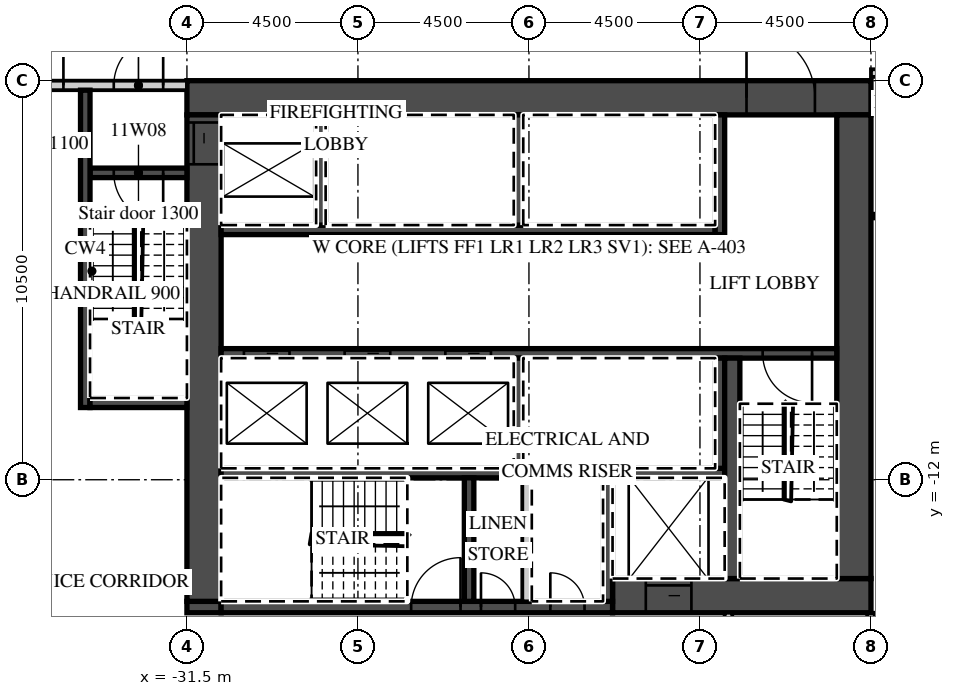
"""IFC4 building model, lengths in metres.
Left out: names, types, materials, properties, quantities, classifications, styles, units other than length and angle.
Written with IfcOpenShell. Run it as: python <this file> out.ifc"""

import sys

from ifc_helpers import new_model, si_unit, direction, frame, frame_2d, origin, place, context, subcontext, project, spatial, rectangle, extrude, element, fill, save


model = new_model("IFC4")
c1 = context("Model", 3, precision=1e-05, world=origin(), true_north=direction((0.0, 1.0)))
c2 = subcontext(c1, "Body", "Model", "MODEL_VIEW")
j1 = project(units=[si_unit("LENGTHUNIT", "METRE"), si_unit("PLANEANGLEUNIT", "RADIAN")], contexts=[c1])
p1 = place(None, origin())
s1 = spatial("IfcSite", under=j1, at=p1, CompositionType="ELEMENT")
p2 = place(p1, origin())
s2 = spatial("IfcBuilding", under=s1, at=p2, CompositionType="ELEMENT")
p3 = place(p2, frame((0.0, 0.0, 66.6)))
s3 = spatial("IfcBuildingStorey", under=s2, at=p3, CompositionType="ELEMENT", Elevation=66.6)
p4 = place(p3, frame((-13.5, -21.55, 0.0), z_axis=(0.0, 0.0, 1.0), x_axis=(0.0, 1.0, 0.0)))
e1 = element("IfcWall", 1, at=p4, inside=s3, PredefinedType="PARTITIONING", context=c2, shape_type="SweptSolid", body=[
    extrude(rectangle(XDim=6.05, YDim=0.2, at=frame_2d((3.025, 0.0))), origin(), (0.0, 0.0, 1.0), 3.02),
])
p5 = place(p3, frame((-13.5, -1.3, 0.0), z_axis=(0.0, 0.0, 1.0), x_axis=(1.0, 0.0, 0.0)))
e2 = element("IfcWall", 2, at=p5, inside=s3, PredefinedType="PARTITIONING", context=c2, shape_type="SweptSolid", body=[
    extrude(rectangle(XDim=58.05, YDim=0.2, at=frame_2d((29.025, 0.0))), origin(), (0.0, 0.0, 1.0), 3.02),
])
p6 = place(p5, frame((2.925, 0.0, 0.0)))
e3 = element("IfcOpeningElement", 3, at=p6, cuts=e2, PredefinedType="OPENING", context=c2, shape_type="SweptSolid", body=[
    extrude(rectangle(XDim=1.0, YDim=2.1, at=frame_2d((0.5, 1.05))), frame((0.0, 0.11, 0.0), z_axis=(0.0, -1.0, 0.0), x_axis=(1.0, 0.0, 0.0)), (0.0, 0.0, 1.0), 0.22),
])
p7 = place(p5, frame((9.863, 0.0, 0.0)))
e4 = element("IfcOpeningElement", 4, at=p7, cuts=e2, PredefinedType="OPENING", context=c2, shape_type="SweptSolid", body=[
    extrude(rectangle(XDim=1.2, YDim=2.1, at=frame_2d((0.6, 1.05))), frame((0.0, 0.11, 0.0), z_axis=(0.0, -1.0, 0.0), x_axis=(1.0, 0.0, 0.0)), (0.0, 0.0, 1.0), 0.22),
])
p8 = place(p5, frame((16.45, 0.0, 0.0)))
e5 = element("IfcOpeningElement", 5, at=p8, cuts=e2, PredefinedType="OPENING", context=c2, shape_type="SweptSolid", body=[
    extrude(rectangle(XDim=1.0, YDim=2.1, at=frame_2d((0.5, 1.05))), frame((0.0, 0.11, 0.0), z_axis=(0.0, -1.0, 0.0), x_axis=(1.0, 0.0, 0.0)), (0.0, 0.0, 1.0), 0.22),
])
p9 = place(p5, frame((18.55, 0.0, 0.0)))
e6 = element("IfcOpeningElement", 6, at=p9, cuts=e2, PredefinedType="OPENING", context=c2, shape_type="SweptSolid", body=[
    extrude(rectangle(XDim=1.0, YDim=2.1, at=frame_2d((0.5, 1.05))), frame((0.0, 0.11, 0.0), z_axis=(0.0, -1.0, 0.0), x_axis=(1.0, 0.0, 0.0)), (0.0, 0.0, 1.0), 0.22),
])
p10 = place(p5, frame((24.938, 0.0, 0.0)))
e7 = element("IfcOpeningElement", 7, at=p10, cuts=e2, PredefinedType="OPENING", context=c2, shape_type="SweptSolid", body=[
    extrude(rectangle(XDim=1.2, YDim=2.1, at=frame_2d((0.6, 1.05))), frame((0.0, 0.11, 0.0), z_axis=(0.0, -1.0, 0.0), x_axis=(1.0, 0.0, 0.0)), (0.0, 0.0, 1.0), 0.22),
])
p11 = place(p5, frame((33.938, 0.0, 0.0)))
e8 = element("IfcOpeningElement", 8, at=p11, cuts=e2, PredefinedType="OPENING", context=c2, shape_type="SweptSolid", body=[
    extrude(rectangle(XDim=1.2, YDim=2.1, at=frame_2d((0.6, 1.05))), frame((0.0, 0.11, 0.0), z_axis=(0.0, -1.0, 0.0), x_axis=(1.0, 0.0, 0.0)), (0.0, 0.0, 1.0), 0.22),
])
p12 = place(p5, frame((42.938, 0.0, 0.0)))
e9 = element("IfcOpeningElement", 9, at=p12, cuts=e2, PredefinedType="OPENING", context=c2, shape_type="SweptSolid", body=[
    extrude(rectangle(XDim=1.2, YDim=2.1, at=frame_2d((0.6, 1.05))), frame((0.0, 0.11, 0.0), z_axis=(0.0, -1.0, 0.0), x_axis=(1.0, 0.0, 0.0)), (0.0, 0.0, 1.0), 0.22),
])
p13 = place(p5, frame((52.425, 0.0, 0.0)))
e10 = element("IfcOpeningElement", 10, at=p13, cuts=e2, PredefinedType="OPENING", context=c2, shape_type="SweptSolid", body=[
    extrude(rectangle(XDim=1.0, YDim=2.1, at=frame_2d((0.5, 1.05))), frame((0.0, 0.11, 0.0), z_axis=(0.0, -1.0, 0.0), x_axis=(1.0, 0.0, 0.0)), (0.0, 0.0, 1.0), 0.22),
])
p14 = place(p5, frame((56.525, 0.0, 0.0)))
e11 = element("IfcOpeningElement", 11, at=p14, cuts=e2, PredefinedType="OPENING", context=c2, shape_type="SweptSolid", body=[
    extrude(rectangle(XDim=1.0, YDim=2.1, at=frame_2d((0.5, 1.05))), frame((0.0, 0.11, 0.0), z_axis=(0.0, -1.0, 0.0), x_axis=(1.0, 0.0, 0.0)), (0.0, 0.0, 1.0), 0.22),
])
p15 = place(p3, frame((-31.5, -1.95, 0.0), z_axis=(0.0, 0.0, 1.0), x_axis=(1.0, 0.0, 0.0)))
e12 = element("IfcWall", 12, at=p15, inside=s3, PredefinedType="SHEAR", context=c2, shape_type="SweptSolid", body=[
    extrude(rectangle(XDim=18.0, YDim=0.9, at=frame_2d((9.0, 0.0))), origin(), (0.0, 0.0, 1.0), 3.02),
])
p16 = place(p15, frame((14.725, 0.0, 0.0)))
e13 = element("IfcOpeningElement", 13, at=p16, cuts=e12, PredefinedType="OPENING", context=c2, shape_type="SweptSolid", body=[
    extrude(rectangle(XDim=1.8, YDim=2.1, at=frame_2d((0.9, 1.05))), frame((0.0, 0.46, 0.0), z_axis=(0.0, -1.0, 0.0), x_axis=(1.0, 0.0, 0.0)), (0.0, 0.0, 1.0), 0.92),
])
p17 = place(p3, frame((-20.3, -15.05, 0.0), z_axis=(0.0, 0.0, 1.0), x_axis=(1.0, 0.0, 0.0)))
e14 = element("IfcWall", 14, at=p17, inside=s3, PredefinedType="SHEAR", context=c2, shape_type="SweptSolid", body=[
    extrude(rectangle(XDim=6.8, YDim=0.9, at=frame_2d((3.4, 0.0))), origin(), (0.0, 0.0, 1.0), 3.02),
])
p18 = place(p17, frame((0.875, 0.0, 0.0)))
e15 = element("IfcOpeningElement", 15, at=p18, cuts=e14, PredefinedType="OPENING", context=c2, shape_type="SweptSolid", body=[
    extrude(rectangle(XDim=1.2, YDim=2.1, at=frame_2d((0.6, 1.05))), frame((0.0, 0.46, 0.0), z_axis=(0.0, -1.0, 0.0), x_axis=(1.0, 0.0, 0.0)), (0.0, 0.0, 1.0), 0.92),
])
p19 = place(p3, frame((-31.5, -15.35, 0.0), z_axis=(0.0, 0.0, 1.0), x_axis=(1.0, 0.0, 0.0)))
e16 = element("IfcWall", 16, at=p19, inside=s3, PredefinedType="SHEAR", context=c2, shape_type="SweptSolid", body=[
    extrude(rectangle(XDim=0.9, YDim=0.3, at=frame_2d((0.45, 0.0))), origin(), (0.0, 0.0, 1.0), 3.02),
])
p20 = place(p3, frame((-30.6, -15.35, 0.0), z_axis=(0.0, 0.0, 1.0), x_axis=(1.0, 0.0, 0.0)))
e17 = element("IfcWall", 17, at=p20, inside=s3, PredefinedType="SHEAR", context=c2, shape_type="SweptSolid", body=[
    extrude(rectangle(XDim=10.3, YDim=0.3, at=frame_2d((5.15, 0.0))), origin(), (0.0, 0.0, 1.0), 3.02),
])
p21 = place(p20, frame((5.0, 0.0, 0.0)))
e18 = element("IfcOpeningElement", 18, at=p21, cuts=e17, PredefinedType="OPENING", context=c2, shape_type="SweptSolid", body=[
    extrude(rectangle(XDim=1.3, YDim=2.1, at=frame_2d((0.65, 1.05))), frame((0.0, 0.16, 0.0), z_axis=(0.0, -1.0, 0.0), x_axis=(1.0, 0.0, 0.0)), (0.0, 0.0, 1.0), 0.32),
])
p22 = place(p20, frame((6.837, 0.0, 0.0)))
e19 = element("IfcOpeningElement", 19, at=p22, cuts=e17, PredefinedType="OPENING", context=c2, shape_type="SweptSolid", body=[
    extrude(rectangle(XDim=0.9, YDim=2.1, at=frame_2d((0.45, 1.05))), frame((0.0, 0.16, 0.0), z_axis=(0.0, -1.0, 0.0), x_axis=(1.0, 0.0, 0.0)), (0.0, 0.0, 1.0), 0.32),
])
p23 = place(p20, frame((8.663, 0.0, 0.0)))
e20 = element("IfcOpeningElement", 20, at=p23, cuts=e17, PredefinedType="OPENING", context=c2, shape_type="SweptSolid", body=[
    extrude(rectangle(XDim=0.9, YDim=2.1, at=frame_2d((0.45, 1.05))), frame((0.0, 0.16, 0.0), z_axis=(0.0, -1.0, 0.0), x_axis=(1.0, 0.0, 0.0)), (0.0, 0.0, 1.0), 0.32),
])
p24 = place(p3, frame((-31.05, -15.2, 0.0), z_axis=(0.0, 0.0, 1.0), x_axis=(0.0, 1.0, 0.0)))
e21 = element("IfcWall", 21, at=p24, inside=s3, PredefinedType="SHEAR", context=c2, shape_type="SweptSolid", body=[
    extrude(rectangle(XDim=12.8, YDim=0.9, at=frame_2d((6.4, 0.0))), origin(), (0.0, 0.0, 1.0), 3.02),
])
p25 = place(p24, frame((11.5, 0.0, 0.0)))
e22 = element("IfcOpeningElement", 22, at=p25, cuts=e21, PredefinedType="OPENING", context=c2, shape_type="SweptSolid", body=[
    extrude(rectangle(XDim=1.1, YDim=2.1, at=frame_2d((0.55, 1.05))), frame((0.0, 0.46, 0.0), z_axis=(0.0, -1.0, 0.0), x_axis=(1.0, 0.0, 0.0)), (0.0, 0.0, 1.0), 0.92),
])
p26 = place(p3, frame((-13.95, -14.6, 0.0), z_axis=(0.0, 0.0, 1.0), x_axis=(0.0, 1.0, 0.0)))
e23 = element("IfcWall", 23, at=p26, inside=s3, PredefinedType="SHEAR", context=c2, shape_type="SweptSolid", body=[
    extrude(rectangle(XDim=12.2, YDim=0.9, at=frame_2d((6.1, 0.0))), origin(), (0.0, 0.0, 1.0), 3.02),
])
p27 = place(p3, frame((-30.6, -5.425, 0.0), z_axis=(0.0, 0.0, 1.0), x_axis=(1.0, 0.0, 0.0)))
e24 = element("IfcWall", 24, at=p27, inside=s3, PredefinedType="SHEAR", context=c2, shape_type="SweptSolid", body=[
    extrude(rectangle(XDim=13.0, YDim=0.25, at=frame_2d((6.5, 0.0))), origin(), (0.0, 0.0, 1.0), 3.02),
])
p28 = place(p3, frame((-17.475, -5.55, 0.0), z_axis=(0.0, 0.0, 1.0), x_axis=(0.0, 1.0, 0.0)))
e25 = element("IfcWall", 25, at=p28, inside=s3, PredefinedType="SHEAR", context=c2, shape_type="SweptSolid", body=[
    extrude(rectangle(XDim=3.15, YDim=0.25, at=frame_2d((1.575, 0.0))), origin(), (0.0, 0.0, 1.0), 3.02),
])
for number, where, z_axis, x_axis in (
    (26, (-27.975, -5.3, 0.0), (0.0, 0.0, 1.0), (0.0, 1.0, 0.0)),
    (27, (-22.775, -5.3, 0.0), (0.0, 0.0, 1.0), (0.0, 1.0, 0.0)),
):
    element("IfcWall", number, at=place(p3, frame(where, z_axis=z_axis, x_axis=x_axis)), inside=s3, PredefinedType="SHEAR", context=c2, shape_type="SweptSolid", body=[
        extrude(rectangle(XDim=2.9, YDim=0.25, at=frame_2d((1.45, 0.0))), origin(), (0.0, 0.0, 1.0), 3.02),
    ])
p29 = place(p3, frame((-30.6, -8.675, 0.0), z_axis=(0.0, 0.0, 1.0), x_axis=(1.0, 0.0, 0.0)))
e28 = element("IfcWall", 28, at=p29, inside=s3, PredefinedType="SHEAR", context=c2, shape_type="SweptSolid", body=[
    extrude(rectangle(XDim=16.2, YDim=0.25, at=frame_2d((8.1, 0.0))), origin(), (0.0, 0.0, 1.0), 3.02),
])
p30 = place(p29, frame((0.6, 0.0, 0.0)))
e29 = element("IfcOpeningElement", 29, at=p30, cuts=e28, PredefinedType="OPENING", context=c2, shape_type="SweptSolid", body=[
    extrude(rectangle(XDim=1.2, YDim=2.1, at=frame_2d((0.6, 1.05))), frame((0.0, 0.135, 0.0), z_axis=(0.0, -1.0, 0.0), x_axis=(1.0, 0.0, 0.0)), (0.0, 0.0, 1.0), 0.27),
])
p31 = place(p29, frame((3.25, 0.0, 0.0)))
e30 = element("IfcOpeningElement", 30, at=p31, cuts=e28, PredefinedType="OPENING", context=c2, shape_type="SweptSolid", body=[
    extrude(rectangle(XDim=1.2, YDim=2.1, at=frame_2d((0.6, 1.05))), frame((0.0, 0.135, 0.0), z_axis=(0.0, -1.0, 0.0), x_axis=(1.0, 0.0, 0.0)), (0.0, 0.0, 1.0), 0.27),
])
p32 = place(p29, frame((5.9, 0.0, 0.0)))
e31 = element("IfcOpeningElement", 31, at=p32, cuts=e28, PredefinedType="OPENING", context=c2, shape_type="SweptSolid", body=[
    extrude(rectangle(XDim=1.2, YDim=2.1, at=frame_2d((0.6, 1.05))), frame((0.0, 0.135, 0.0), z_axis=(0.0, -1.0, 0.0), x_axis=(1.0, 0.0, 0.0)), (0.0, 0.0, 1.0), 0.27),
])
p33 = place(p29, frame((14.25, 0.0, 0.0)))
e32 = element("IfcOpeningElement", 32, at=p33, cuts=e28, PredefinedType="OPENING", context=c2, shape_type="SweptSolid", body=[
    extrude(rectangle(XDim=1.3, YDim=2.1, at=frame_2d((0.65, 1.05))), frame((0.0, 0.135, 0.0), z_axis=(0.0, -1.0, 0.0), x_axis=(1.0, 0.0, 0.0)), (0.0, 0.0, 1.0), 0.27),
])
p34 = place(p3, frame((-30.6, -11.825, 0.0), z_axis=(0.0, 0.0, 1.0), x_axis=(1.0, 0.0, 0.0)))
e33 = element("IfcWall", 33, at=p34, inside=s3, PredefinedType="SHEAR", context=c2, shape_type="SweptSolid", body=[
    extrude(rectangle(XDim=13.25, YDim=0.25, at=frame_2d((6.625, 0.0))), origin(), (0.0, 0.0, 1.0), 3.02),
])
for number, where, z_axis, x_axis in (
    (34, (-17.475, -11.7, 0.0), (0.0, 0.0, 1.0), (0.0, 1.0, 0.0)),
    (35, (-22.775, -11.7, 0.0), (0.0, 0.0, 1.0), (0.0, 1.0, 0.0)),
):
    element("IfcWall", number, at=place(p3, frame(where, z_axis=z_axis, x_axis=x_axis)), inside=s3, PredefinedType="SHEAR", context=c2, shape_type="SweptSolid", body=[
        extrude(rectangle(XDim=2.9, YDim=0.25, at=frame_2d((1.45, 0.0))), origin(), (0.0, 0.0, 1.0), 3.02),
    ])
p35 = place(p3, frame((-17.15, -14.6, 0.0), z_axis=(0.0, 0.0, 1.0), x_axis=(0.0, 1.0, 0.0)))
e36 = element("IfcWall", 36, at=p35, inside=s3, PredefinedType="SHEAR", context=c2, shape_type="SweptSolid", body=[
    extrude(rectangle(XDim=5.8, YDim=0.4, at=frame_2d((2.9, 0.0))), origin(), (0.0, 0.0, 1.0), 3.02),
])
for number, where, z_axis, x_axis in (
    (37, (-20.425, -15.2, 0.0), (0.0, 0.0, 1.0), (0.0, 1.0, 0.0)),
    (38, (-24.075, -15.2, 0.0), (0.0, 0.0, 1.0), (0.0, 1.0, 0.0)),
):
    element("IfcWall", number, at=place(p3, frame(where, z_axis=z_axis, x_axis=x_axis)), inside=s3, PredefinedType="SHEAR", context=c2, shape_type="SweptSolid", body=[
        extrude(rectangle(XDim=3.25, YDim=0.25, at=frame_2d((1.625, 0.0))), origin(), (0.0, 0.0, 1.0), 3.02),
    ])
p36 = place(p3, frame((-22.55, -15.2, 0.0), z_axis=(0.0, 0.0, 1.0), x_axis=(0.0, 1.0, 0.0)))
e39 = element("IfcWall", 39, at=p36, inside=s3, PredefinedType="PARTITIONING", context=c2, shape_type="SweptSolid", body=[
    extrude(rectangle(XDim=3.25, YDim=0.25, at=frame_2d((1.625, 0.0))), origin(), (0.0, 0.0, 1.0), 3.02),
])
p37 = place(p3, frame((-44.55, -1.625, 0.0), z_axis=(0.0, 0.0, 1.0), x_axis=(1.0, 0.0, 0.0)))
e40 = element("IfcWall", 40, at=p37, inside=s3, PredefinedType="PARTITIONING", context=c2, shape_type="SweptSolid", body=[
    extrude(rectangle(XDim=13.05, YDim=0.25, at=frame_2d((6.525, 0.0))), origin(), (0.0, 0.0, 1.0), 3.02),
])
p38 = place(p37, frame((11.125, 0.0, 0.0)))
e41 = element("IfcOpeningElement", 41, at=p38, cuts=e40, PredefinedType="OPENING", context=c2, shape_type="SweptSolid", body=[
    extrude(rectangle(XDim=1.3, YDim=2.1, at=frame_2d((0.65, 1.05))), frame((0.0, 0.135, 0.0), z_axis=(0.0, -1.0, 0.0), x_axis=(1.0, 0.0, 0.0)), (0.0, 0.0, 1.0), 0.27),
])
p39 = place(p37, frame((8.7, 0.0, 0.0)))
e42 = element("IfcOpeningElement", 42, at=p39, cuts=e40, PredefinedType="OPENING", context=c2, shape_type="SweptSolid", body=[
    extrude(rectangle(XDim=1.1, YDim=2.1, at=frame_2d((0.55, 1.05))), frame((0.0, 0.135, 0.0), z_axis=(0.0, -1.0, 0.0), x_axis=(1.0, 0.0, 0.0)), (0.0, 0.0, 1.0), 0.27),
])
p40 = place(p3, frame((-34.05, -3.925, 0.0), z_axis=(0.0, 0.0, 1.0), x_axis=(1.0, 0.0, 0.0)))
e43 = element("IfcWall", 43, at=p40, inside=s3, PredefinedType="SHEAR", context=c2, shape_type="SweptSolid", body=[
    extrude(rectangle(XDim=2.55, YDim=0.25, at=frame_2d((1.275, 0.0))), origin(), (0.0, 0.0, 1.0), 3.02),
])
p41 = place(p40, frame((0.625, 0.0, 0.0)))
e44 = element("IfcOpeningElement", 44, at=p41, cuts=e43, PredefinedType="OPENING", context=c2, shape_type="SweptSolid", body=[
    extrude(rectangle(XDim=1.3, YDim=2.1, at=frame_2d((0.65, 1.05))), frame((0.0, 0.135, 0.0), z_axis=(0.0, -1.0, 0.0), x_axis=(1.0, 0.0, 0.0)), (0.0, 0.0, 1.0), 0.27),
])
p42 = place(p3, frame((-34.175, -10.1, 0.0), z_axis=(0.0, 0.0, 1.0), x_axis=(0.0, 1.0, 0.0)))
e45 = element("IfcWall", 45, at=p42, inside=s3, PredefinedType="SHEAR", context=c2, shape_type="SweptSolid", body=[
    extrude(rectangle(XDim=8.35, YDim=0.25, at=frame_2d((4.175, 0.0))), origin(), (0.0, 0.0, 1.0), 3.02),
])
p43 = place(p3, frame((-34.05, -9.975, 0.0), z_axis=(0.0, 0.0, 1.0), x_axis=(1.0, 0.0, 0.0)))
e46 = element("IfcWall", 46, at=p43, inside=s3, PredefinedType="SHEAR", context=c2, shape_type="SweptSolid", body=[
    extrude(rectangle(XDim=2.55, YDim=0.25, at=frame_2d((1.275, 0.0))), origin(), (0.0, 0.0, 1.0), 3.02),
])
p44 = place(p3, frame((-17.25, -17.7, 0.0), z_axis=(0.0, 0.0, 1.0), x_axis=(0.0, 1.0, 0.0)))
e47 = element("IfcWall", 47, at=p44, inside=s3, PredefinedType="PARTITIONING", context=c2, shape_type="SweptSolid", body=[
    extrude(rectangle(XDim=2.2, YDim=0.2, at=frame_2d((1.1, 0.0))), origin(), (0.0, 0.0, 1.0), 3.02),
])
p45 = place(p30, origin())
e48 = element("IfcDoor", 48, at=p45, inside=s3, OperationType="SLIDING_TO_LEFT", PredefinedType="DOOR", context=c2, shape_type="SweptSolid", body=[
    extrude(rectangle(XDim=1.2, YDim=2.1, at=frame_2d((0.6, 1.05))), frame((0.0, 0.025, 0.0), z_axis=(0.0, -1.0, 0.0), x_axis=(1.0, 0.0, 0.0)), (0.0, 0.0, 1.0), 0.05),
])
fill(e29, e48)
p46 = place(p31, origin())
e49 = element("IfcDoor", 49, at=p46, inside=s3, OperationType="SLIDING_TO_RIGHT", PredefinedType="DOOR", context=c2, shape_type="SweptSolid", body=[
    extrude(rectangle(XDim=1.2, YDim=2.1, at=frame_2d((0.6, 1.05))), frame((0.0, 0.025, 0.0), z_axis=(0.0, -1.0, 0.0), x_axis=(1.0, 0.0, 0.0)), (0.0, 0.0, 1.0), 0.05),
])
fill(e30, e49)
p47 = place(p32, origin())
e50 = element("IfcDoor", 50, at=p47, inside=s3, OperationType="SLIDING_TO_RIGHT", PredefinedType="DOOR", context=c2, shape_type="SweptSolid", body=[
    extrude(rectangle(XDim=1.2, YDim=2.1, at=frame_2d((0.6, 1.05))), frame((0.0, 0.025, 0.0), z_axis=(0.0, -1.0, 0.0), x_axis=(1.0, 0.0, 0.0)), (0.0, 0.0, 1.0), 0.05),
])
fill(e31, e50)
p48 = place(p18, origin())
e51 = element("IfcDoor", 51, at=p48, inside=s3, OperationType="SLIDING_TO_LEFT", PredefinedType="DOOR", context=c2, shape_type="SweptSolid", body=[
    extrude(rectangle(XDim=1.2, YDim=2.1, at=frame_2d((0.6, 1.05))), frame((0.0, 0.025, 0.0), z_axis=(0.0, -1.0, 0.0), x_axis=(1.0, 0.0, 0.0)), (0.0, 0.0, 1.0), 0.05),
])
fill(e15, e51)
p49 = place(p25, origin())
e52 = element("IfcDoor", 52, at=p49, inside=s3, OperationType="SLIDING_TO_RIGHT", PredefinedType="DOOR", context=c2, shape_type="SweptSolid", body=[
    extrude(rectangle(XDim=1.1, YDim=2.1, at=frame_2d((0.55, 1.05))), frame((0.0, 0.025, 0.0), z_axis=(0.0, -1.0, 0.0), x_axis=(1.0, 0.0, 0.0)), (0.0, 0.0, 1.0), 0.05),
])
fill(e22, e52)
p50 = place(p16, origin())
e53 = element("IfcDoor", 53, at=p50, inside=s3, OperationType="DOUBLE_DOOR_DOUBLE_SWING", PredefinedType="DOOR", context=c2, shape_type="SweptSolid", body=[
    extrude(rectangle(XDim=1.8, YDim=2.1, at=frame_2d((0.9, 1.05))), frame((0.0, 0.025, 0.0), z_axis=(0.0, -1.0, 0.0), x_axis=(1.0, 0.0, 0.0)), (0.0, 0.0, 1.0), 0.05),
])
fill(e13, e53)
p51 = place(p38, origin())
e54 = element("IfcDoor", 54, at=p51, inside=s3, OperationType="SINGLE_SWING_RIGHT", PredefinedType="DOOR", context=c2, shape_type="SweptSolid", body=[
    extrude(rectangle(XDim=1.3, YDim=2.1, at=frame_2d((0.65, 1.05))), frame((0.0, 0.025, 0.0), z_axis=(0.0, -1.0, 0.0), x_axis=(1.0, 0.0, 0.0)), (0.0, 0.0, 1.0), 0.05),
])
fill(e41, e54)
p52 = place(p41, origin())
e55 = element("IfcDoor", 55, at=p52, inside=s3, OperationType="SINGLE_SWING_RIGHT", PredefinedType="DOOR", context=c2, shape_type="SweptSolid", body=[
    extrude(rectangle(XDim=1.3, YDim=2.1, at=frame_2d((0.65, 1.05))), frame((0.0, 0.025, 0.0), z_axis=(0.0, -1.0, 0.0), x_axis=(1.0, 0.0, 0.0)), (0.0, 0.0, 1.0), 0.05),
])
fill(e44, e55)
p53 = place(p39, origin())
e56 = element("IfcDoor", 56, at=p53, inside=s3, OperationType="SINGLE_SWING_RIGHT", PredefinedType="DOOR", context=c2, shape_type="SweptSolid", body=[
    extrude(rectangle(XDim=1.1, YDim=2.1, at=frame_2d((0.55, 1.05))), frame((0.0, 0.025, 0.0), z_axis=(0.0, -1.0, 0.0), x_axis=(1.0, 0.0, 0.0)), (0.0, 0.0, 1.0), 0.05),
])
fill(e42, e56)
p54 = place(p33, origin())
e57 = element("IfcDoor", 57, at=p54, inside=s3, OperationType="SINGLE_SWING_RIGHT", PredefinedType="DOOR", context=c2, shape_type="SweptSolid", body=[
    extrude(rectangle(XDim=1.3, YDim=2.1, at=frame_2d((0.65, 1.05))), frame((0.0, 0.025, 0.0), z_axis=(0.0, -1.0, 0.0), x_axis=(1.0, 0.0, 0.0)), (0.0, 0.0, 1.0), 0.05),
])
fill(e32, e57)
p55 = place(p21, origin())
e58 = element("IfcDoor", 58, at=p55, inside=s3, OperationType="SINGLE_SWING_RIGHT", PredefinedType="DOOR", context=c2, shape_type="SweptSolid", body=[
    extrude(rectangle(XDim=1.3, YDim=2.1, at=frame_2d((0.65, 1.05))), frame((0.0, 0.025, 0.0), z_axis=(0.0, -1.0, 0.0), x_axis=(1.0, 0.0, 0.0)), (0.0, 0.0, 1.0), 0.05),
])
fill(e18, e58)
p56 = place(p22, origin())
e59 = element("IfcDoor", 59, at=p56, inside=s3, OperationType="SINGLE_SWING_LEFT", PredefinedType="DOOR", context=c2, shape_type="SweptSolid", body=[
    extrude(rectangle(XDim=0.9, YDim=2.1, at=frame_2d((0.45, 1.05))), frame((0.0, 0.025, 0.0), z_axis=(0.0, -1.0, 0.0), x_axis=(1.0, 0.0, 0.0)), (0.0, 0.0, 1.0), 0.05),
])
fill(e19, e59)
p57 = place(p23, origin())
e60 = element("IfcDoor", 60, at=p57, inside=s3, OperationType="SINGLE_SWING_LEFT", PredefinedType="DOOR", context=c2, shape_type="SweptSolid", body=[
    extrude(rectangle(XDim=0.9, YDim=2.1, at=frame_2d((0.45, 1.05))), frame((0.0, 0.025, 0.0), z_axis=(0.0, -1.0, 0.0), x_axis=(1.0, 0.0, 0.0)), (0.0, 0.0, 1.0), 0.05),
])
fill(e20, e60)
save(model, sys.argv[1])
